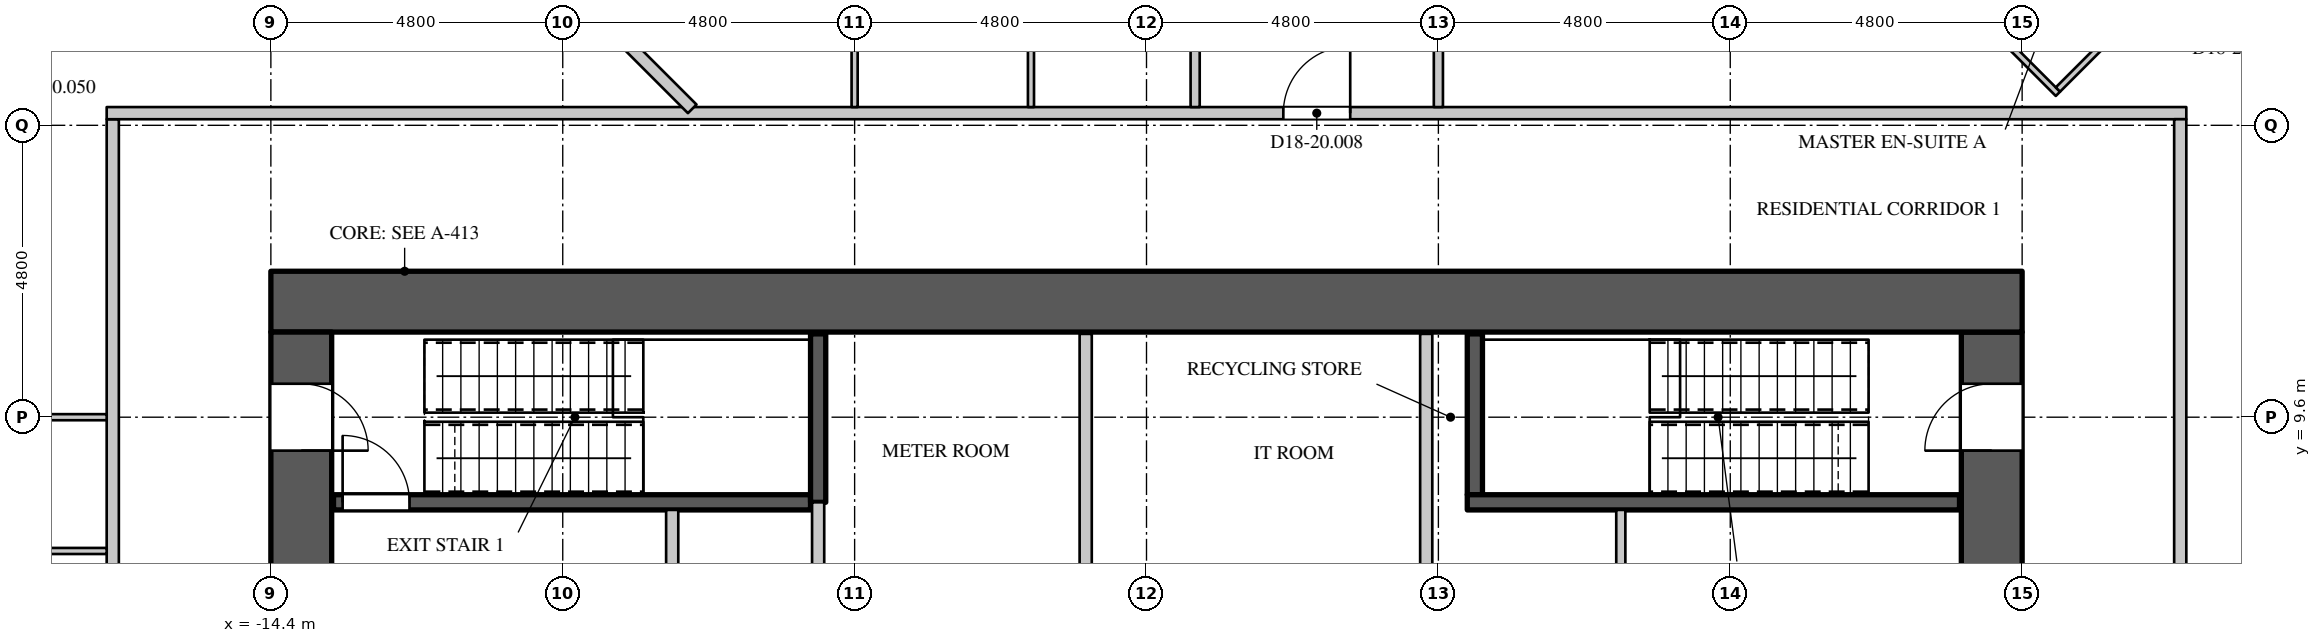
"""IFC4 building model, lengths in metres.
Left out: names, types, materials, properties, quantities, classifications, styles, units other than length and angle.
Written with IfcOpenShell. Run it as: python <this file> out.ifc"""

import sys

from ifc_helpers import new_model, si_unit, direction, frame, frame_2d, origin, place, context, subcontext, project, spatial, rectangle, extrude, element, fill, save


model = new_model("IFC4")
c1 = context("Model", 3, precision=1e-05, world=origin(), true_north=direction((0.0, 1.0)))
c2 = subcontext(c1, "Body", "Model", "MODEL_VIEW")
j1 = project(units=[si_unit("LENGTHUNIT", "METRE"), si_unit("PLANEANGLEUNIT", "RADIAN")], contexts=[c1])
p1 = place(None, origin())
s1 = spatial("IfcSite", under=j1, at=p1, CompositionType="ELEMENT")
p2 = place(p1, origin())
s2 = spatial("IfcBuilding", under=s1, at=p2, CompositionType="ELEMENT")
p3 = place(p2, frame((0.0, 0.0, 80.1)))
s3 = spatial("IfcBuildingStorey", under=s2, at=p3, CompositionType="ELEMENT", Elevation=80.1)
p4 = place(p3, frame((-14.4, 11.5, 0.0), z_axis=(0.0, 0.0, 1.0), x_axis=(1.0, 0.0, 0.0)))
e1 = element("IfcWall", 1, at=p4, inside=s3, PredefinedType="SHEAR", context=c2, shape_type="SweptSolid", body=[
    extrude(rectangle(XDim=28.8, YDim=1.0, at=frame_2d((14.4, 0.0))), origin(), (0.0, 0.0, 1.0), 4.2),
])
p5 = place(p3, frame((13.9, -11.0, 0.0), z_axis=(0.0, 0.0, 1.0), x_axis=(0.0, 1.0, 0.0)))
e2 = element("IfcWall", 2, at=p5, inside=s3, PredefinedType="SHEAR", context=c2, shape_type="SweptSolid", body=[
    extrude(rectangle(XDim=22.0, YDim=1.0, at=frame_2d((11.0, 0.0))), origin(), (0.0, 0.0, 1.0), 4.2),
])
p6 = place(p5, frame((20.05, 0.0, 0.0)))
e3 = element("IfcOpeningElement", 3, at=p6, cuts=e2, PredefinedType="OPENING", context=c2, shape_type="SweptSolid", body=[
    extrude(rectangle(XDim=1.1, YDim=2.2, at=frame_2d((0.55, 1.1))), frame((0.0, 0.51, 0.0), z_axis=(0.0, -1.0, 0.0), x_axis=(1.0, 0.0, 0.0)), (0.0, 0.0, 1.0), 1.02),
])
p7 = place(p5, frame((0.85, 0.0, 0.0)))
e4 = element("IfcOpeningElement", 4, at=p7, cuts=e2, PredefinedType="OPENING", context=c2, shape_type="SweptSolid", body=[
    extrude(rectangle(XDim=1.1, YDim=2.2, at=frame_2d((0.55, 1.1))), frame((0.0, 0.51, 0.0), z_axis=(0.0, -1.0, 0.0), x_axis=(1.0, 0.0, 0.0)), (0.0, 0.0, 1.0), 1.02),
])
p8 = place(p5, frame((14.55, 0.0, 0.0)))
e5 = element("IfcOpeningElement", 5, at=p8, cuts=e2, PredefinedType="OPENING", context=c2, shape_type="SweptSolid", body=[
    extrude(rectangle(XDim=1.5, YDim=2.4, at=frame_2d((0.75, 1.2))), frame((0.0, 0.51, 0.0), z_axis=(0.0, -1.0, 0.0), x_axis=(1.0, 0.0, 0.0)), (0.0, 0.0, 1.0), 1.02),
])
p9 = place(p5, frame((5.95, 0.0, 0.0)))
e6 = element("IfcOpeningElement", 6, at=p9, cuts=e2, PredefinedType="OPENING", context=c2, shape_type="SweptSolid", body=[
    extrude(rectangle(XDim=1.5, YDim=2.4, at=frame_2d((0.75, 1.2))), frame((0.0, 0.51, 0.0), z_axis=(0.0, -1.0, 0.0), x_axis=(1.0, 0.0, 0.0)), (0.0, 0.0, 1.0), 1.02),
])
p10 = place(p3, frame((-13.9, -11.0, 0.0), z_axis=(0.0, 0.0, 1.0), x_axis=(0.0, 1.0, 0.0)))
e7 = element("IfcWall", 7, at=p10, inside=s3, PredefinedType="SHEAR", context=c2, shape_type="SweptSolid", body=[
    extrude(rectangle(XDim=22.0, YDim=1.0, at=frame_2d((11.0, 0.0))), origin(), (0.0, 0.0, 1.0), 4.2),
])
p11 = place(p10, frame((20.05, 0.0, 0.0)))
e8 = element("IfcOpeningElement", 8, at=p11, cuts=e7, PredefinedType="OPENING", context=c2, shape_type="SweptSolid", body=[
    extrude(rectangle(XDim=1.1, YDim=2.2, at=frame_2d((0.55, 1.1))), frame((0.0, 0.51, 0.0), z_axis=(0.0, -1.0, 0.0), x_axis=(1.0, 0.0, 0.0)), (0.0, 0.0, 1.0), 1.02),
])
p12 = place(p10, frame((0.85, 0.0, 0.0)))
e9 = element("IfcOpeningElement", 9, at=p12, cuts=e7, PredefinedType="OPENING", context=c2, shape_type="SweptSolid", body=[
    extrude(rectangle(XDim=1.1, YDim=2.2, at=frame_2d((0.55, 1.1))), frame((0.0, 0.51, 0.0), z_axis=(0.0, -1.0, 0.0), x_axis=(1.0, 0.0, 0.0)), (0.0, 0.0, 1.0), 1.02),
])
p13 = place(p10, frame((15.75, 0.0, 0.0)))
e10 = element("IfcOpeningElement", 10, at=p13, cuts=e7, PredefinedType="OPENING", context=c2, shape_type="SweptSolid", body=[
    extrude(rectangle(XDim=1.5, YDim=2.4, at=frame_2d((0.75, 1.2))), frame((0.0, 0.51, 0.0), z_axis=(0.0, -1.0, 0.0), x_axis=(1.0, 0.0, 0.0)), (0.0, 0.0, 1.0), 1.02),
])
p14 = place(p10, frame((4.75, 0.0, 0.0)))
e11 = element("IfcOpeningElement", 11, at=p14, cuts=e7, PredefinedType="OPENING", context=c2, shape_type="SweptSolid", body=[
    extrude(rectangle(XDim=1.5, YDim=2.4, at=frame_2d((0.75, 1.2))), frame((0.0, 0.51, 0.0), z_axis=(0.0, -1.0, 0.0), x_axis=(1.0, 0.0, 0.0)), (0.0, 0.0, 1.0), 1.02),
])
p15 = place(p3, frame((-17.0, -14.5, 0.0), z_axis=(0.0, 0.0, 1.0), x_axis=(0.0, 1.0, 0.0)))
e12 = element("IfcWall", 12, at=p15, inside=s3, PredefinedType="PARTITIONING", context=c2, shape_type="SweptSolid", body=[
    extrude(rectangle(XDim=29.0, YDim=0.2, at=frame_2d((14.5, 0.0))), origin(), (0.0, 0.0, 1.0), 3.95),
])
p16 = place(p15, frame((16.5, 0.0, 0.0)))
e13 = element("IfcOpeningElement", 13, at=p16, cuts=e12, PredefinedType="OPENING", context=c2, shape_type="SweptSolid", body=[
    extrude(rectangle(XDim=1.1, YDim=2.4, at=frame_2d((0.55, 1.2))), frame((0.0, 0.11, 0.0), z_axis=(0.0, -1.0, 0.0), x_axis=(1.0, 0.0, 0.0)), (0.0, 0.0, 1.0), 0.22),
])
p17 = place(p3, frame((-17.1, 14.6, 0.0), z_axis=(0.0, 0.0, 1.0), x_axis=(1.0, 0.0, 0.0)))
e14 = element("IfcWall", 14, at=p17, inside=s3, PredefinedType="PARTITIONING", context=c2, shape_type="SweptSolid", body=[
    extrude(rectangle(XDim=34.2, YDim=0.2, at=frame_2d((17.1, 0.0))), origin(), (0.0, 0.0, 1.0), 3.95),
])
p18 = place(p17, frame((19.35, 0.0, 0.0)))
e15 = element("IfcOpeningElement", 15, at=p18, cuts=e14, PredefinedType="OPENING", context=c2, shape_type="SweptSolid", body=[
    extrude(rectangle(XDim=1.1, YDim=2.4, at=frame_2d((0.55, 1.2))), frame((0.0, 0.11, 0.0), z_axis=(0.0, -1.0, 0.0), x_axis=(1.0, 0.0, 0.0)), (0.0, 0.0, 1.0), 0.22),
])
p19 = place(p3, frame((-7.8, 2.8, 0.0), z_axis=(0.0, 0.0, 1.0), x_axis=(0.0, 1.0, 0.0)))
e16 = element("IfcWall", 16, at=p19, inside=s3, PredefinedType="PARTITIONING", context=c2, shape_type="SweptSolid", body=[
    extrude(rectangle(XDim=5.275, YDim=0.2, at=frame_2d((2.637, 0.0))), origin(), (0.0, 0.0, 1.0), 3.95),
])
p20 = place(p19, frame((0.75, 0.0, 0.0)))
e17 = element("IfcOpeningElement", 17, at=p20, cuts=e16, PredefinedType="OPENING", context=c2, shape_type="SweptSolid", body=[
    extrude(rectangle(XDim=1.5, YDim=2.4, at=frame_2d((0.75, 1.2))), frame((0.0, 0.11, 0.0), z_axis=(0.0, -1.0, 0.0), x_axis=(1.0, 0.0, 0.0)), (0.0, 0.0, 1.0), 0.22),
])
p21 = place(p3, frame((17.0, -14.5, 0.0), z_axis=(0.0, 0.0, 1.0), x_axis=(0.0, 1.0, 0.0)))
e18 = element("IfcWall", 18, at=p21, inside=s3, PredefinedType="PARTITIONING", context=c2, shape_type="SweptSolid", body=[
    extrude(rectangle(XDim=29.0, YDim=0.2, at=frame_2d((14.5, 0.0))), origin(), (0.0, 0.0, 1.0), 3.95),
])
p22 = place(p3, frame((-22.547, 11.885, 0.0), z_axis=(0.0, 0.0, 1.0), x_axis=(0.707106781187, 0.707106781187, 0.0)))
e19 = element("IfcWall", 19, at=p22, inside=s3, PredefinedType="PARTITIONING", context=c2, shape_type="SweptSolid", body=[
    extrude(rectangle(XDim=9.85, YDim=0.15, at=frame_2d((4.925, 0.0))), origin(), (0.0, 0.0, 1.0), 3.95),
])
p23 = place(p22, frame((3.95, 0.0, 0.0)))
e20 = element("IfcOpeningElement", 20, at=p23, cuts=e19, PredefinedType="OPENING", context=c2, shape_type="SweptSolid", body=[
    extrude(rectangle(XDim=0.95, YDim=2.2, at=frame_2d((0.475, 1.1))), frame((0.0, 0.085, 0.0), z_axis=(0.0, -1.0, 0.0), x_axis=(1.0, 0.0, 0.0)), (0.0, 0.0, 1.0), 0.17),
])
p24 = place(p22, frame((8.25, 0.0, 0.0)))
e21 = element("IfcOpeningElement", 21, at=p24, cuts=e19, PredefinedType="OPENING", context=c2, shape_type="SweptSolid", body=[
    extrude(rectangle(XDim=0.95, YDim=2.2, at=frame_2d((0.475, 1.1))), frame((0.0, 0.085, 0.0), z_axis=(0.0, -1.0, 0.0), x_axis=(1.0, 0.0, 0.0)), (0.0, 0.0, 1.0), 0.17),
])
p25 = place(p3, frame((0.8, 14.7, 0.0), z_axis=(0.0, 0.0, 1.0), x_axis=(0.0, 1.0, 0.0)))
e22 = element("IfcWall", 22, at=p25, inside=s3, PredefinedType="PARTITIONING", context=c2, shape_type="SweptSolid", body=[
    extrude(rectangle(XDim=7.025, YDim=0.15, at=frame_2d((3.513, 0.0))), origin(), (0.0, 0.0, 1.0), 3.95),
])
p26 = place(p25, frame((3.05, 0.0, 0.0)))
e23 = element("IfcOpeningElement", 23, at=p26, cuts=e22, PredefinedType="OPENING", context=c2, shape_type="SweptSolid", body=[
    extrude(rectangle(XDim=0.95, YDim=2.2, at=frame_2d((0.475, 1.1))), frame((0.0, 0.085, 0.0), z_axis=(0.0, -1.0, 0.0), x_axis=(1.0, 0.0, 0.0)), (0.0, 0.0, 1.0), 0.17),
])
p27 = place(p3, frame((4.8, 14.7, 0.0), z_axis=(0.0, 0.0, 1.0), x_axis=(0.0, 1.0, 0.0)))
e24 = element("IfcWall", 24, at=p27, inside=s3, PredefinedType="PARTITIONING", context=c2, shape_type="SweptSolid", body=[
    extrude(rectangle(XDim=13.2, YDim=0.15, at=frame_2d((6.6, 0.0))), origin(), (0.0, 0.0, 1.0), 3.2),
])
p28 = place(p27, frame((3.0, 0.0, 0.0)))
e25 = element("IfcOpeningElement", 25, at=p28, cuts=e24, PredefinedType="OPENING", context=c2, shape_type="SweptSolid", body=[
    extrude(rectangle(XDim=0.95, YDim=2.2, at=frame_2d((0.475, 1.1))), frame((0.0, 0.085, 0.0), z_axis=(0.0, -1.0, 0.0), x_axis=(1.0, 0.0, 0.0)), (0.0, 0.0, 1.0), 0.17),
])
p29 = place(p3, frame((7.8, 5.9, 0.0), z_axis=(0.0, 0.0, 1.0), x_axis=(0.0, 1.0, 0.0)))
e26 = element("IfcWall", 26, at=p29, inside=s3, PredefinedType="PARTITIONING", context=c2, shape_type="SweptSolid", body=[
    extrude(rectangle(XDim=2.175, YDim=0.15, at=frame_2d((1.087, 0.0))), origin(), (0.0, 0.0, 1.0), 3.95),
])
p30 = place(p3, frame((17.552, 17.446, 0.0), z_axis=(0.0, 0.0, 1.0), x_axis=(0.707106781187, -0.707106781187, 0.0)))
e27 = element("IfcWall", 27, at=p30, inside=s3, PredefinedType="PARTITIONING", context=c2, shape_type="SweptSolid", body=[
    extrude(rectangle(XDim=7.78, YDim=0.15, at=frame_2d((3.89, 0.0))), origin(), (0.0, 0.0, 1.0), 3.95),
])
p31 = place(p30, frame((2.05, 0.0, 0.0)))
e28 = element("IfcOpeningElement", 28, at=p31, cuts=e27, PredefinedType="OPENING", context=c2, shape_type="SweptSolid", body=[
    extrude(rectangle(XDim=0.95, YDim=2.2, at=frame_2d((0.475, 1.1))), frame((0.0, 0.085, 0.0), z_axis=(0.0, -1.0, 0.0), x_axis=(1.0, 0.0, 0.0)), (0.0, 0.0, 1.0), 0.17),
])
p32 = place(p30, frame((6.65, 0.0, 0.0)))
e29 = element("IfcOpeningElement", 29, at=p32, cuts=e27, PredefinedType="OPENING", context=c2, shape_type="SweptSolid", body=[
    extrude(rectangle(XDim=0.95, YDim=2.2, at=frame_2d((0.475, 1.1))), frame((0.0, 0.085, 0.0), z_axis=(0.0, -1.0, 0.0), x_axis=(1.0, 0.0, 0.0)), (0.0, 0.0, 1.0), 0.17),
])
p33 = place(p3, frame((-18.039, 25.239, 0.0), z_axis=(0.0, 0.0, 1.0), x_axis=(0.707106781187, -0.707106781187, 0.0)))
e30 = element("IfcWall", 30, at=p33, inside=s3, PredefinedType="PARTITIONING", context=c2, shape_type="SweptSolid", body=[
    extrude(rectangle(XDim=14.946, YDim=0.2, at=frame_2d((7.473, 0.0))), origin(), (0.0, 0.0, 1.0), 3.95),
])
p34 = place(p3, frame((-5.4, 5.9, 0.0), z_axis=(0.0, 0.0, 1.0), x_axis=(0.0, 1.0, 0.0)))
e31 = element("IfcWall", 31, at=p34, inside=s3, PredefinedType="PARTITIONING", context=c2, shape_type="SweptSolid", body=[
    extrude(rectangle(XDim=2.3, YDim=0.2, at=frame_2d((1.15, 0.0))), origin(), (0.0, 0.0, 1.0), 3.95),
])
for number, where, z_axis, x_axis in (
    (32, (-1.0, 5.9, 0.0), (0.0, 0.0, 1.0), (0.0, 1.0, 0.0)),
    (33, (4.6, 5.9, 0.0), (0.0, 0.0, 1.0), (0.0, 1.0, 0.0)),
):
    element("IfcWall", number, at=place(p3, frame(where, z_axis=z_axis, x_axis=x_axis)), inside=s3, PredefinedType="PARTITIONING", context=c2, shape_type="SweptSolid", body=[
        extrude(rectangle(XDim=5.07, YDim=0.2, at=frame_2d((2.535, 0.0))), origin(), (0.0, 0.0, 1.0), 3.95),
    ])
p35 = place(p3, frame((-13.37, 8.2, 0.0), z_axis=(0.0, 0.0, 1.0), x_axis=(1.0, 0.0, 0.0)))
e34 = element("IfcWall", 34, at=p35, inside=s3, PredefinedType="SHEAR", context=c2, shape_type="SweptSolid", body=[
    extrude(rectangle(XDim=7.845, YDim=0.25, at=frame_2d((3.923, 0.0))), origin(), (0.0, 0.0, 1.0), 3.95),
])
p36 = place(p35, frame((0.15, 0.0, 0.0)))
e35 = element("IfcOpeningElement", 35, at=p36, cuts=e34, PredefinedType="OPENING", context=c2, shape_type="SweptSolid", body=[
    extrude(rectangle(XDim=1.1, YDim=2.2, at=frame_2d((0.55, 1.1))), frame((0.0, 0.135, 0.0), z_axis=(0.0, -1.0, 0.0), x_axis=(1.0, 0.0, 0.0)), (0.0, 0.0, 1.0), 0.27),
])
p37 = place(p3, frame((-5.4, 8.2, 0.0), z_axis=(0.0, 0.0, 1.0), x_axis=(0.0, 1.0, 0.0)))
e36 = element("IfcWall", 36, at=p37, inside=s3, PredefinedType="SHEAR", context=c2, shape_type="SweptSolid", body=[
    extrude(rectangle(XDim=2.77, YDim=0.25, at=frame_2d((1.385, 0.0))), origin(), (0.0, 0.0, 1.0), 3.95),
])
p38 = place(p3, frame((5.4, 8.325, 0.0), z_axis=(0.0, 0.0, 1.0), x_axis=(0.0, 1.0, 0.0)))
e37 = element("IfcWall", 37, at=p38, inside=s3, PredefinedType="SHEAR", context=c2, shape_type="SweptSolid", body=[
    extrude(rectangle(XDim=2.645, YDim=0.25, at=frame_2d((1.323, 0.0))), origin(), (0.0, 0.0, 1.0), 3.95),
])
p39 = place(p3, frame((5.275, 8.2, 0.0), z_axis=(0.0, 0.0, 1.0), x_axis=(1.0, 0.0, 0.0)))
e38 = element("IfcWall", 38, at=p39, inside=s3, PredefinedType="SHEAR", context=c2, shape_type="SweptSolid", body=[
    extrude(rectangle(XDim=8.095, YDim=0.25, at=frame_2d((4.048, 0.0))), origin(), (0.0, 0.0, 1.0), 3.95),
])
p40 = place(p3, frame((-21.78, 9.6, 0.0), z_axis=(0.0, 0.0, 1.0), x_axis=(1.0, 0.0, 0.0)))
e39 = element("IfcWall", 39, at=p40, inside=s3, PredefinedType="PARTITIONING", context=c2, shape_type="SweptSolid", body=[
    extrude(rectangle(XDim=4.68, YDim=0.1, at=frame_2d((2.34, 0.0))), origin(), (0.0, 0.0, 1.0), 3.95),
])
p41 = place(p40, frame((1.85, 0.0, 0.0)))
e40 = element("IfcOpeningElement", 40, at=p41, cuts=e39, PredefinedType="OPENING", context=c2, shape_type="SweptSolid", body=[
    extrude(rectangle(XDim=0.9, YDim=2.2, at=frame_2d((0.45, 1.1))), frame((0.0, 0.06, 0.0), z_axis=(0.0, -1.0, 0.0), x_axis=(1.0, 0.0, 0.0)), (0.0, 0.0, 1.0), 0.12),
])
p42 = place(p3, frame((-21.725, 7.4, 0.0), z_axis=(0.0, 0.0, 1.0), x_axis=(1.0, 0.0, 0.0)))
e41 = element("IfcWall", 41, at=p42, inside=s3, PredefinedType="PARTITIONING", context=c2, shape_type="SweptSolid", body=[
    extrude(rectangle(XDim=4.625, YDim=0.1, at=frame_2d((2.312, 0.0))), origin(), (0.0, 0.0, 1.0), 3.95),
])
p43 = place(p3, frame((-4.8, 14.7, 0.0), z_axis=(0.0, 0.0, 1.0), x_axis=(0.0, 1.0, 0.0)))
e42 = element("IfcWall", 42, at=p43, inside=s3, PredefinedType="PARTITIONING", context=c2, shape_type="SweptSolid", body=[
    extrude(rectangle(XDim=8.32, YDim=0.1, at=frame_2d((4.16, 0.0))), origin(), (0.0, 0.0, 1.0), 3.2),
])
p44 = place(p43, frame((2.15, 0.0, 0.0)))
e43 = element("IfcOpeningElement", 43, at=p44, cuts=e42, PredefinedType="OPENING", context=c2, shape_type="SweptSolid", body=[
    extrude(rectangle(XDim=0.9, YDim=2.2, at=frame_2d((0.45, 1.1))), frame((0.0, 0.06, 0.0), z_axis=(0.0, -1.0, 0.0), x_axis=(1.0, 0.0, 0.0)), (0.0, 0.0, 1.0), 0.12),
])
p45 = place(p3, frame((-1.9, 14.7, 0.0), z_axis=(0.0, 0.0, 1.0), x_axis=(0.0, 1.0, 0.0)))
e44 = element("IfcWall", 44, at=p45, inside=s3, PredefinedType="PARTITIONING", context=c2, shape_type="SweptSolid", body=[
    extrude(rectangle(XDim=7.025, YDim=0.1, at=frame_2d((3.513, 0.0))), origin(), (0.0, 0.0, 1.0), 3.95),
])
p46 = place(p3, frame((13.079, 16.827, 0.0), z_axis=(0.0, 0.0, 1.0), x_axis=(0.707061571201, -0.707151988282, 0.0)))
e45 = element("IfcWall", 45, at=p46, inside=s3, PredefinedType="PARTITIONING", context=c2, shape_type="SweptSolid", body=[
    extrude(rectangle(XDim=2.7, YDim=0.1, at=frame_2d((1.35, 0.0))), origin(), (0.0, 0.0, 1.0), 3.95),
])
p47 = place(p3, frame((14.989, 14.989, 0.0), z_axis=(0.0, 0.0, 1.0), x_axis=(0.707106781187, 0.707106781187, 0.0)))
e46 = element("IfcWall", 46, at=p47, inside=s3, PredefinedType="PARTITIONING", context=c2, shape_type="SweptSolid", body=[
    extrude(rectangle(XDim=2.93, YDim=0.1, at=frame_2d((1.465, 0.0))), origin(), (0.0, 0.0, 1.0), 3.95),
])
p48 = place(p36, origin())
e47 = element("IfcDoor", 47, at=p48, inside=s3, OperationType="SINGLE_SWING_LEFT", PredefinedType="DOOR", context=c2, shape_type="SweptSolid", body=[
    extrude(rectangle(XDim=1.1, YDim=2.2, at=frame_2d((0.55, 1.1))), frame((0.0, 0.025, 0.0), z_axis=(0.0, -1.0, 0.0), x_axis=(1.0, 0.0, 0.0)), (0.0, 0.0, 1.0), 0.05),
])
fill(e35, e47)
p49 = place(p11, origin())
e48 = element("IfcDoor", 48, at=p49, inside=s3, OperationType="SINGLE_SWING_RIGHT", PredefinedType="DOOR", context=c2, shape_type="SweptSolid", body=[
    extrude(rectangle(XDim=1.1, YDim=2.2, at=frame_2d((0.55, 1.1))), frame((0.0, -0.445, 0.0), z_axis=(0.0, -1.0, 0.0), x_axis=(1.0, 0.0, 0.0)), (0.0, 0.0, 1.0), 0.05),
])
fill(e8, e48)
p50 = place(p6, origin())
e49 = element("IfcDoor", 49, at=p50, inside=s3, OperationType="SINGLE_SWING_LEFT", PredefinedType="DOOR", context=c2, shape_type="SweptSolid", body=[
    extrude(rectangle(XDim=1.1, YDim=2.2, at=frame_2d((0.55, 1.1))), frame((0.0, 0.495, 0.0), z_axis=(0.0, -1.0, 0.0), x_axis=(1.0, 0.0, 0.0)), (0.0, 0.0, 1.0), 0.05),
])
fill(e3, e49)
p51 = place(p18, origin())
e50 = element("IfcDoor", 50, at=p51, inside=s3, OperationType="SINGLE_SWING_RIGHT", PredefinedType="DOOR", context=c2, shape_type="SweptSolid", body=[
    extrude(rectangle(XDim=1.1, YDim=2.4, at=frame_2d((0.55, 1.2))), frame((0.0, 0.025, 0.0), z_axis=(0.0, -1.0, 0.0), x_axis=(1.0, 0.0, 0.0)), (0.0, 0.0, 1.0), 0.05),
])
fill(e15, e50)
save(model, sys.argv[1])
